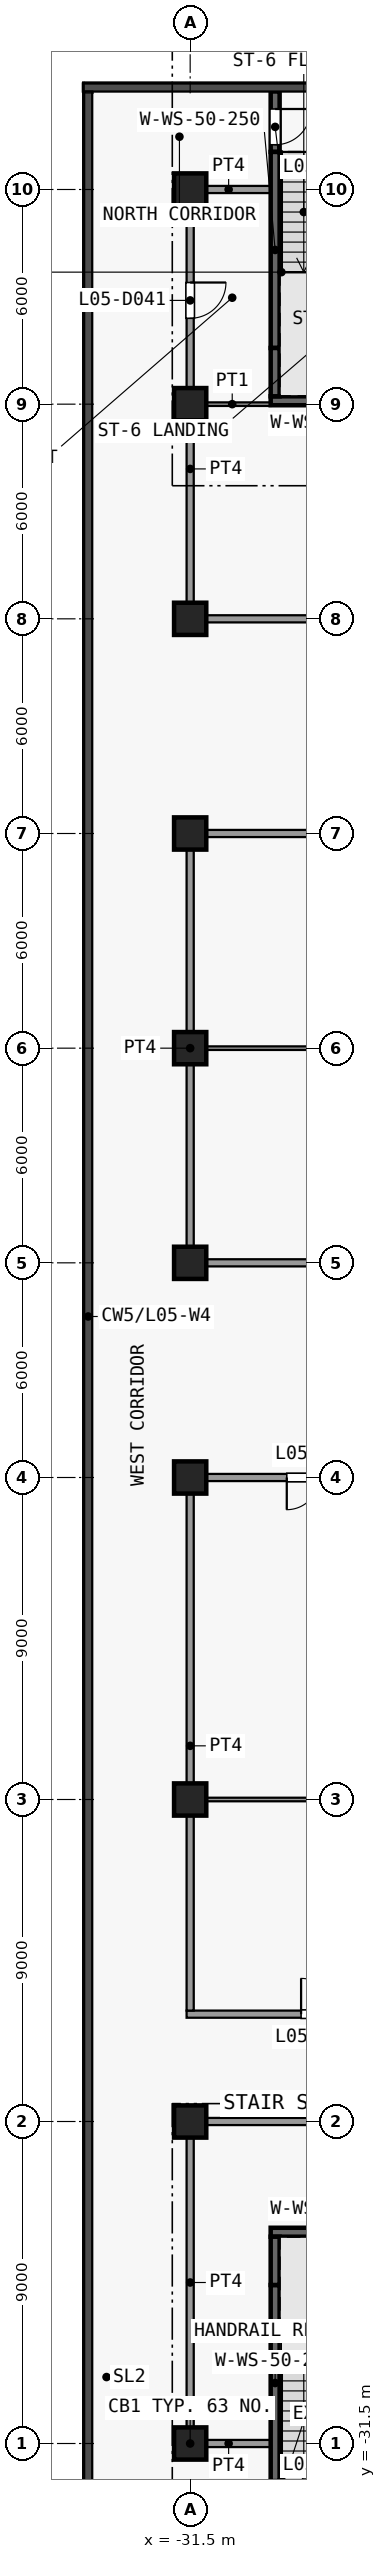
"""IFC4 building model, lengths in metres.
Left out: names, types, materials, properties, quantities, classifications, styles, units other than length and angle.
Written with IfcOpenShell. Run it as: python <this file> out.ifc"""

import sys

from ifc_helpers import new_model, si_unit, direction, frame, frame_2d, origin, origin_2d, place, context, subcontext, project, spatial, rectangle, extrude, element, fill, save


model = new_model("IFC4")
c1 = context("Model", 3, precision=1e-05, world=origin(), true_north=direction((0.0, 1.0)))
c2 = subcontext(c1, "Body", "Model", "MODEL_VIEW")
j1 = project(units=[si_unit("LENGTHUNIT", "METRE"), si_unit("PLANEANGLEUNIT", "RADIAN")], contexts=[c1])
p1 = place(None, origin())
s1 = spatial("IfcSite", under=j1, at=p1, CompositionType="ELEMENT")
p2 = place(p1, origin())
s2 = spatial("IfcBuilding", under=s1, at=p2, CompositionType="ELEMENT")
p3 = place(p2, frame((0.0, 0.0, 28.0)))
s3 = spatial("IfcBuildingStorey", under=s2, at=p3, CompositionType="ELEMENT", Elevation=28.0)
for number, where, z_axis, x_axis in (
    (1, (-31.5, -31.5, 0.0), (0.0, 0.0, 1.0), (1.0, 0.0, 0.0)),
    (2, (-31.5, -22.5, 0.0), (0.0, 0.0, 1.0), (1.0, 0.0, 0.0)),
    (3, (-31.5, -13.5, 0.0), (0.0, 0.0, 1.0), (1.0, 0.0, 0.0)),
    (4, (-31.5, -4.5, 0.0), (0.0, 0.0, 1.0), (1.0, 0.0, 0.0)),
    (5, (-31.5, 1.5, 0.0), (0.0, 0.0, 1.0), (1.0, 0.0, 0.0)),
    (6, (-31.5, 7.5, 0.0), (0.0, 0.0, 1.0), (1.0, 0.0, 0.0)),
    (7, (-31.5, 13.5, 0.0), (0.0, 0.0, 1.0), (1.0, 0.0, 0.0)),
    (8, (-31.5, 19.5, 0.0), (0.0, 0.0, 1.0), (1.0, 0.0, 0.0)),
    (9, (-31.5, 25.5, 0.0), (0.0, 0.0, 1.0), (1.0, 0.0, 0.0)),
    (10, (-31.5, 31.5, 0.0), (0.0, 0.0, 1.0), (1.0, 0.0, 0.0)),
):
    element("IfcColumn", number, at=place(p3, frame(where, z_axis=z_axis, x_axis=x_axis)), inside=s3, PredefinedType="COLUMN", context=c2, shape_type="SweptSolid", body=[
        extrude(rectangle(XDim=0.9, YDim=0.9, at=origin_2d()), origin(), (0.0, 0.0, 1.0), 4.5),
    ])
p4 = place(p3, frame((-29.125, -32.55, 0.0), z_axis=(0.0, 0.0, 1.0), x_axis=(0.0, 1.0, 0.0)))
e11 = element("IfcWall", 11, at=p4, inside=s3, PredefinedType="SHEAR", context=c2, shape_type="SweptSolid", body=[
    extrude(rectangle(XDim=5.48, YDim=0.25, at=frame_2d((2.74, 0.0))), origin(), (0.0, 0.0, 1.0), 4.1),
])
p5 = place(p3, frame((-29.125, -27.07, 0.0), z_axis=(0.0, 0.0, 1.0), x_axis=(0.0, 1.0, 0.0)))
e12 = element("IfcWall", 12, at=p5, inside=s3, PredefinedType="SHEAR", context=c2, shape_type="SweptSolid", body=[
    extrude(rectangle(XDim=1.35, YDim=0.25, at=frame_2d((0.675, 0.0))), origin(), (0.0, 0.0, 1.0), 4.1),
])
p6 = place(p3, frame((-29.25, -25.595, 0.0), z_axis=(0.0, 0.0, 1.0), x_axis=(1.0, 0.0, 0.0)))
e13 = element("IfcWall", 13, at=p6, inside=s3, PredefinedType="SHEAR", context=c2, shape_type="SweptSolid", body=[
    extrude(rectangle(XDim=3.35, YDim=0.25, at=frame_2d((1.675, 0.0))), origin(), (0.0, 0.0, 1.0), 4.1),
])
p7 = place(p3, frame((-29.125, 34.24, 0.0), z_axis=(0.0, 0.0, 1.0), x_axis=(0.0, -1.0, 0.0)))
e14 = element("IfcWall", 14, at=p7, inside=s3, PredefinedType="SHEAR", context=c2, shape_type="SweptSolid", body=[
    extrude(rectangle(XDim=1.69, YDim=0.25, at=frame_2d((0.845, 0.0))), origin(), (0.0, 0.0, 1.0), 4.1),
])
p8 = place(p7, frame((0.49, 0.0, 0.0)))
e15 = element("IfcOpeningElement", 15, at=p8, cuts=e14, PredefinedType="OPENING", context=c2, shape_type="SweptSolid", body=[
    extrude(rectangle(XDim=1.0, YDim=2.1, at=frame_2d((0.5, 1.05))), frame((0.0, 0.135, 0.0), z_axis=(0.0, -1.0, 0.0), x_axis=(1.0, 0.0, 0.0)), (0.0, 0.0, 1.0), 0.27),
])
p9 = place(p3, frame((-29.125, 27.07, 0.0), z_axis=(0.0, 0.0, 1.0), x_axis=(0.0, 1.0, 0.0)))
e16 = element("IfcWall", 16, at=p9, inside=s3, PredefinedType="SHEAR", context=c2, shape_type="SweptSolid", body=[
    extrude(rectangle(XDim=5.48, YDim=0.25, at=frame_2d((2.74, 0.0))), origin(), (0.0, 0.0, 1.0), 4.1),
])
p10 = place(p3, frame((-29.125, 25.72, 0.0), z_axis=(0.0, 0.0, 1.0), x_axis=(0.0, 1.0, 0.0)))
e17 = element("IfcWall", 17, at=p10, inside=s3, PredefinedType="SHEAR", context=c2, shape_type="SweptSolid", body=[
    extrude(rectangle(XDim=1.35, YDim=0.25, at=frame_2d((0.675, 0.0))), origin(), (0.0, 0.0, 1.0), 4.1),
])
p11 = place(p3, frame((-29.25, 25.595, 0.0), z_axis=(0.0, 0.0, 1.0), x_axis=(1.0, 0.0, 0.0)))
e18 = element("IfcWall", 18, at=p11, inside=s3, PredefinedType="SHEAR", context=c2, shape_type="SweptSolid", body=[
    extrude(rectangle(XDim=3.35, YDim=0.25, at=frame_2d((1.675, 0.0))), origin(), (0.0, 0.0, 1.0), 4.1),
])
p12 = place(p3, frame((-31.6, -31.5, 0.0), z_axis=(0.0, 0.0, 1.0), x_axis=(1.0, 0.0, 0.0)))
e19 = element("IfcWall", 19, at=p12, inside=s3, PredefinedType="PARTITIONING", context=c2, shape_type="SweptSolid", body=[
    extrude(rectangle(XDim=2.35, YDim=0.2, at=frame_2d((1.175, 0.0))), origin(), (0.0, 0.0, 1.0), 4.1),
])
p13 = place(p3, frame((-31.6, -22.5, 0.0), z_axis=(0.0, 0.0, 1.0), x_axis=(1.0, 0.0, 0.0)))
e20 = element("IfcWall", 20, at=p13, inside=s3, PredefinedType="PARTITIONING", context=c2, shape_type="SweptSolid", body=[
    extrude(rectangle(XDim=14.2, YDim=0.2, at=frame_2d((7.1, 0.0))), origin(), (0.0, 0.0, 1.0), 4.1),
])
p14 = place(p3, frame((-31.6, -19.5, 0.0), z_axis=(0.0, 0.0, 1.0), x_axis=(1.0, 0.0, 0.0)))
e21 = element("IfcWall", 21, at=p14, inside=s3, PredefinedType="PARTITIONING", context=c2, shape_type="SweptSolid", body=[
    extrude(rectangle(XDim=18.1, YDim=0.2, at=frame_2d((9.05, 0.0))), origin(), (0.0, 0.0, 1.0), 4.1),
])
p15 = place(p14, frame((3.2, 0.0, 0.0)))
e22 = element("IfcOpeningElement", 22, at=p15, cuts=e21, PredefinedType="OPENING", context=c2, shape_type="SweptSolid", body=[
    extrude(rectangle(XDim=1.0, YDim=2.1, at=frame_2d((0.5, 1.05))), frame((0.0, 0.11, 0.0), z_axis=(0.0, -1.0, 0.0), x_axis=(1.0, 0.0, 0.0)), (0.0, 0.0, 1.0), 0.22),
])
p16 = place(p14, frame((14.0, 0.0, 0.0)))
e23 = element("IfcOpeningElement", 23, at=p16, cuts=e21, PredefinedType="OPENING", context=c2, shape_type="SweptSolid", body=[
    extrude(rectangle(XDim=1.0, YDim=2.1, at=frame_2d((0.5, 1.05))), frame((0.0, 0.11, 0.0), z_axis=(0.0, -1.0, 0.0), x_axis=(1.0, 0.0, 0.0)), (0.0, 0.0, 1.0), 0.22),
])
p17 = place(p3, frame((-31.4, -13.5, 0.0), z_axis=(0.0, 0.0, 1.0), x_axis=(1.0, 0.0, 0.0)))
e24 = element("IfcWall", 24, at=p17, inside=s3, PredefinedType="PARTITIONING", context=c2, shape_type="SweptSolid", body=[
    extrude(rectangle(XDim=17.9, YDim=0.1, at=frame_2d((8.95, 0.0))), origin(), (0.0, 0.0, 1.0), 4.1),
])
p18 = place(p3, frame((-31.6, -4.5, 0.0), z_axis=(0.0, 0.0, 1.0), x_axis=(1.0, 0.0, 0.0)))
e25 = element("IfcWall", 25, at=p18, inside=s3, PredefinedType="PARTITIONING", context=c2, shape_type="SweptSolid", body=[
    extrude(rectangle(XDim=18.2, YDim=0.2, at=frame_2d((9.1, 0.0))), origin(), (0.0, 0.0, 1.0), 4.1),
])
p19 = place(p18, frame((2.8, 0.0, 0.0)))
e26 = element("IfcOpeningElement", 26, at=p19, cuts=e25, PredefinedType="OPENING", context=c2, shape_type="SweptSolid", body=[
    extrude(rectangle(XDim=1.8, YDim=2.1, at=frame_2d((0.9, 1.05))), frame((0.0, 0.11, 0.0), z_axis=(0.0, -1.0, 0.0), x_axis=(1.0, 0.0, 0.0)), (0.0, 0.0, 1.0), 0.22),
])
p20 = place(p18, frame((12.4, 0.0, 0.0)))
e27 = element("IfcOpeningElement", 27, at=p20, cuts=e25, PredefinedType="OPENING", context=c2, shape_type="SweptSolid", body=[
    extrude(rectangle(XDim=1.8, YDim=2.1, at=frame_2d((0.9, 1.05))), frame((0.0, 0.11, 0.0), z_axis=(0.0, -1.0, 0.0), x_axis=(1.0, 0.0, 0.0)), (0.0, 0.0, 1.0), 0.22),
])
p21 = place(p3, frame((-31.6, 1.5, 0.0), z_axis=(0.0, 0.0, 1.0), x_axis=(1.0, 0.0, 0.0)))
e28 = element("IfcWall", 28, at=p21, inside=s3, PredefinedType="PARTITIONING", context=c2, shape_type="SweptSolid", body=[
    extrude(rectangle(XDim=11.3, YDim=0.2, at=frame_2d((5.65, 0.0))), origin(), (0.0, 0.0, 1.0), 4.1),
])
p22 = place(p21, frame((5.1, 0.0, 0.0)))
e29 = element("IfcOpeningElement", 29, at=p22, cuts=e28, PredefinedType="OPENING", context=c2, shape_type="SweptSolid", body=[
    extrude(rectangle(XDim=1.0, YDim=2.1, at=frame_2d((0.5, 1.05))), frame((0.0, 0.11, 0.0), z_axis=(0.0, -1.0, 0.0), x_axis=(1.0, 0.0, 0.0)), (0.0, 0.0, 1.0), 0.22),
])
p23 = place(p3, frame((-31.4, 7.5, 0.0), z_axis=(0.0, 0.0, 1.0), x_axis=(1.0, 0.0, 0.0)))
e30 = element("IfcWall", 30, at=p23, inside=s3, PredefinedType="PARTITIONING", context=c2, shape_type="SweptSolid", body=[
    extrude(rectangle(XDim=10.9, YDim=0.1, at=frame_2d((5.45, 0.0))), origin(), (0.0, 0.0, 1.0), 4.1),
])
p24 = place(p3, frame((-31.6, 13.5, 0.0), z_axis=(0.0, 0.0, 1.0), x_axis=(1.0, 0.0, 0.0)))
e31 = element("IfcWall", 31, at=p24, inside=s3, PredefinedType="PARTITIONING", context=c2, shape_type="SweptSolid", body=[
    extrude(rectangle(XDim=11.3, YDim=0.2, at=frame_2d((5.65, 0.0))), origin(), (0.0, 0.0, 1.0), 4.1),
])
p25 = place(p24, frame((5.1, 0.0, 0.0)))
e32 = element("IfcOpeningElement", 32, at=p25, cuts=e31, PredefinedType="OPENING", context=c2, shape_type="SweptSolid", body=[
    extrude(rectangle(XDim=1.0, YDim=2.1, at=frame_2d((0.5, 1.05))), frame((0.0, 0.11, 0.0), z_axis=(0.0, -1.0, 0.0), x_axis=(1.0, 0.0, 0.0)), (0.0, 0.0, 1.0), 0.22),
])
p26 = place(p3, frame((-31.6, 19.5, 0.0), z_axis=(0.0, 0.0, 1.0), x_axis=(1.0, 0.0, 0.0)))
e33 = element("IfcWall", 33, at=p26, inside=s3, PredefinedType="PARTITIONING", context=c2, shape_type="SweptSolid", body=[
    extrude(rectangle(XDim=60.1, YDim=0.2, at=frame_2d((30.05, 0.0))), origin(), (0.0, 0.0, 1.0), 4.1),
])
p27 = place(p26, frame((6.3, 0.0, 0.0)))
e34 = element("IfcOpeningElement", 34, at=p27, cuts=e33, PredefinedType="OPENING", context=c2, shape_type="SweptSolid", body=[
    extrude(rectangle(XDim=1.0, YDim=2.1, at=frame_2d((0.5, 1.05))), frame((0.0, 0.11, 0.0), z_axis=(0.0, -1.0, 0.0), x_axis=(1.0, 0.0, 0.0)), (0.0, 0.0, 1.0), 0.22),
])
p28 = place(p26, frame((25.2, 0.0, 0.0)))
e35 = element("IfcOpeningElement", 35, at=p28, cuts=e33, PredefinedType="OPENING", context=c2, shape_type="SweptSolid", body=[
    extrude(rectangle(XDim=1.0, YDim=2.1, at=frame_2d((0.5, 1.05))), frame((0.0, 0.11, 0.0), z_axis=(0.0, -1.0, 0.0), x_axis=(1.0, 0.0, 0.0)), (0.0, 0.0, 1.0), 0.22),
])
p29 = place(p26, frame((38.1, 0.0, 0.0)))
e36 = element("IfcOpeningElement", 36, at=p29, cuts=e33, PredefinedType="OPENING", context=c2, shape_type="SweptSolid", body=[
    extrude(rectangle(XDim=1.0, YDim=2.1, at=frame_2d((0.5, 1.05))), frame((0.0, 0.11, 0.0), z_axis=(0.0, -1.0, 0.0), x_axis=(1.0, 0.0, 0.0)), (0.0, 0.0, 1.0), 0.22),
])
p30 = place(p26, frame((52.2, 0.0, 0.0)))
e37 = element("IfcOpeningElement", 37, at=p30, cuts=e33, PredefinedType="OPENING", context=c2, shape_type="SweptSolid", body=[
    extrude(rectangle(XDim=1.0, YDim=2.1, at=frame_2d((0.5, 1.05))), frame((0.0, 0.11, 0.0), z_axis=(0.0, -1.0, 0.0), x_axis=(1.0, 0.0, 0.0)), (0.0, 0.0, 1.0), 0.22),
])
p31 = place(p3, frame((-31.4, 25.5, 0.0), z_axis=(0.0, 0.0, 1.0), x_axis=(1.0, 0.0, 0.0)))
e38 = element("IfcWall", 38, at=p31, inside=s3, PredefinedType="PARTITIONING", context=c2, shape_type="SweptSolid", body=[
    extrude(rectangle(XDim=2.15, YDim=0.1, at=frame_2d((1.075, 0.0))), origin(), (0.0, 0.0, 1.0), 4.1),
])
p32 = place(p3, frame((-31.6, 31.5, 0.0), z_axis=(0.0, 0.0, 1.0), x_axis=(1.0, 0.0, 0.0)))
e39 = element("IfcWall", 39, at=p32, inside=s3, PredefinedType="PARTITIONING", context=c2, shape_type="SweptSolid", body=[
    extrude(rectangle(XDim=2.35, YDim=0.2, at=frame_2d((1.175, 0.0))), origin(), (0.0, 0.0, 1.0), 4.1),
])
p33 = place(p3, frame((-31.5, -31.4, 0.0), z_axis=(0.0, 0.0, 1.0), x_axis=(0.0, 1.0, 0.0)))
e40 = element("IfcWall", 40, at=p33, inside=s3, PredefinedType="PARTITIONING", context=c2, shape_type="SweptSolid", body=[
    extrude(rectangle(XDim=8.8, YDim=0.2, at=frame_2d((4.4, 0.0))), origin(), (0.0, 0.0, 1.0), 4.1),
])
p34 = place(p3, frame((-31.5, -19.4, 0.0), z_axis=(0.0, 0.0, 1.0), x_axis=(0.0, 1.0, 0.0)))
e41 = element("IfcWall", 41, at=p34, inside=s3, PredefinedType="PARTITIONING", context=c2, shape_type="SweptSolid", body=[
    extrude(rectangle(XDim=14.8, YDim=0.2, at=frame_2d((7.4, 0.0))), origin(), (0.0, 0.0, 1.0), 4.1),
])
p35 = place(p3, frame((-31.5, 1.6, 0.0), z_axis=(0.0, 0.0, 1.0), x_axis=(0.0, 1.0, 0.0)))
e42 = element("IfcWall", 42, at=p35, inside=s3, PredefinedType="PARTITIONING", context=c2, shape_type="SweptSolid", body=[
    extrude(rectangle(XDim=11.8, YDim=0.2, at=frame_2d((5.9, 0.0))), origin(), (0.0, 0.0, 1.0), 4.1),
])
p36 = place(p3, frame((-31.5, 19.6, 0.0), z_axis=(0.0, 0.0, 1.0), x_axis=(0.0, 1.0, 0.0)))
e43 = element("IfcWall", 43, at=p36, inside=s3, PredefinedType="PARTITIONING", context=c2, shape_type="SweptSolid", body=[
    extrude(rectangle(XDim=11.8, YDim=0.2, at=frame_2d((5.9, 0.0))), origin(), (0.0, 0.0, 1.0), 4.1),
])
p37 = place(p36, frame((8.3, 0.0, 0.0)))
e44 = element("IfcOpeningElement", 44, at=p37, cuts=e43, PredefinedType="OPENING", context=c2, shape_type="SweptSolid", body=[
    extrude(rectangle(XDim=1.0, YDim=2.1, at=frame_2d((0.5, 1.05))), frame((0.0, 0.11, 0.0), z_axis=(0.0, -1.0, 0.0), x_axis=(1.0, 0.0, 0.0)), (0.0, 0.0, 1.0), 0.22),
])
p38 = place(p8, origin())
e45 = element("IfcDoor", 45, at=p38, inside=s3, OperationType="SINGLE_SWING_LEFT", PredefinedType="DOOR", context=c2, shape_type="SweptSolid", body=[
    extrude(rectangle(XDim=1.0, YDim=2.1, at=frame_2d((0.5, 1.05))), frame((0.0, 0.025, 0.0), z_axis=(0.0, -1.0, 0.0), x_axis=(1.0, 0.0, 0.0)), (0.0, 0.0, 1.0), 0.05),
])
fill(e15, e45)
p39 = place(p15, origin())
e46 = element("IfcDoor", 46, at=p39, inside=s3, OperationType="SINGLE_SWING_RIGHT", PredefinedType="DOOR", context=c2, shape_type="SweptSolid", body=[
    extrude(rectangle(XDim=1.0, YDim=2.1, at=frame_2d((0.5, 1.05))), frame((0.0, 0.025, 0.0), z_axis=(0.0, -1.0, 0.0), x_axis=(1.0, 0.0, 0.0)), (0.0, 0.0, 1.0), 0.05),
])
fill(e22, e46)
p40 = place(p19, origin())
e47 = element("IfcDoor", 47, at=p40, inside=s3, OperationType="DOUBLE_DOOR_SINGLE_SWING", PredefinedType="DOOR", context=c2, shape_type="SweptSolid", body=[
    extrude(rectangle(XDim=1.8, YDim=2.1, at=frame_2d((0.9, 1.05))), frame((0.0, 0.025, 0.0), z_axis=(0.0, -1.0, 0.0), x_axis=(1.0, 0.0, 0.0)), (0.0, 0.0, 1.0), 0.05),
])
fill(e26, e47)
p41 = place(p37, origin())
e48 = element("IfcDoor", 48, at=p41, inside=s3, OperationType="SINGLE_SWING_RIGHT", PredefinedType="DOOR", context=c2, shape_type="SweptSolid", body=[
    extrude(rectangle(XDim=1.0, YDim=2.1, at=frame_2d((0.5, 1.05))), frame((0.0, 0.025, 0.0), z_axis=(0.0, -1.0, 0.0), x_axis=(1.0, 0.0, 0.0)), (0.0, 0.0, 1.0), 0.05),
])
fill(e44, e48)
save(model, sys.argv[1])
